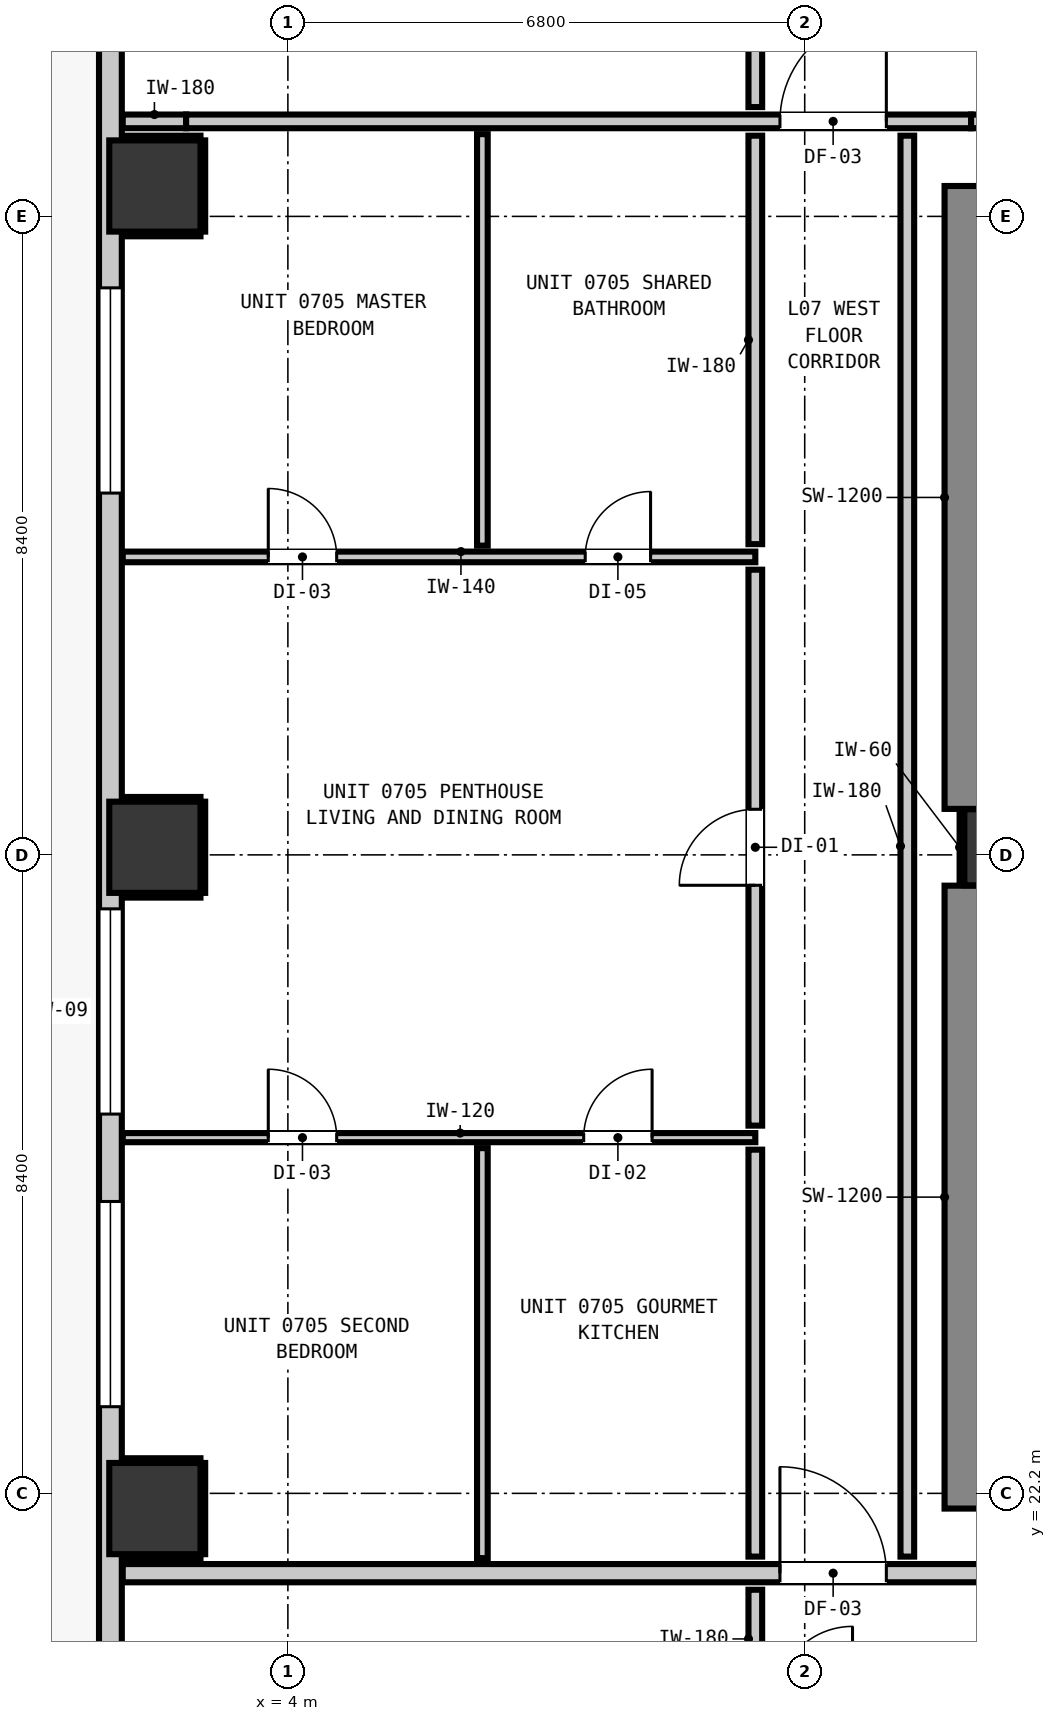
"""IFC4 building model, lengths in metres.
Left out: names, types, materials, properties, quantities, classifications, styles, units other than length and angle.
Written with IfcOpenShell. Run it as: python <this file> out.ifc"""

import sys

from ifc_helpers import new_model, si_unit, direction, frame, frame_2d, origin, origin_2d, place, context, subcontext, project, spatial, rectangle, extrude, element, fill, save


model = new_model("IFC4")
c1 = context("Model", 3, precision=1e-05, world=origin(), true_north=direction((0.0, 1.0)))
c2 = subcontext(c1, "Body", "Model", "MODEL_VIEW")
j1 = project(units=[si_unit("LENGTHUNIT", "METRE"), si_unit("PLANEANGLEUNIT", "RADIAN")], contexts=[c1])
p1 = place(None, origin())
s1 = spatial("IfcSite", under=j1, at=p1, CompositionType="ELEMENT")
p2 = place(p1, origin())
s2 = spatial("IfcBuilding", under=s1, at=p2, CompositionType="ELEMENT")
p3 = place(p2, frame((0.0, 0.0, 28.64)))
s3 = spatial("IfcBuildingStorey", under=s2, at=p3, CompositionType="ELEMENT", Elevation=28.64)
p4 = place(p3, frame((13.4, 30.7, 0.0), z_axis=(0.0, 0.0, 1.0), x_axis=(1.0, 0.0, 0.0)))
e1 = element("IfcColumn", 1, at=p4, inside=s3, PredefinedType="COLUMN", context=c2, shape_type="SweptSolid", body=[
    extrude(rectangle(XDim=1.0, YDim=1.0, at=origin_2d()), origin(), (0.0, 0.0, 1.0), 3.32),
])
p5 = place(p3, frame((13.24, 22.0, 0.0), z_axis=(0.0, 0.0, 1.0), x_axis=(0.0, 1.0, 0.0)))
e2 = element("IfcWall", 2, at=p5, inside=s3, PredefinedType="SHEAR", context=c2, shape_type="SweptSolid", body=[
    extrude(rectangle(XDim=8.195, YDim=1.2, at=frame_2d((4.098, 0.0))), origin(), (0.0, 0.0, 1.0), 3.32),
])
p6 = place(p3, frame((13.24, 31.205, 0.0), z_axis=(0.0, 0.0, 1.0), x_axis=(0.0, 1.0, 0.0)))
e3 = element("IfcWall", 3, at=p6, inside=s3, PredefinedType="SHEAR", context=c2, shape_type="SweptSolid", body=[
    extrude(rectangle(XDim=8.195, YDim=1.2, at=frame_2d((4.097, 0.0))), origin(), (0.0, 0.0, 1.0), 3.32),
])
for number, where, z_axis, x_axis in (
    (4, (2.25, 22.0, 0.0), (0.0, 0.0, 1.0), (1.0, 0.0, 0.0)),
    (5, (2.25, 30.7, 0.0), (0.0, 0.0, 1.0), (1.0, 0.0, 0.0)),
    (6, (2.25, 39.4, 0.0), (0.0, 0.0, 1.0), (1.0, 0.0, 0.0)),
):
    element("IfcColumn", number, at=place(p3, frame(where, z_axis=z_axis, x_axis=x_axis)), inside=s3, PredefinedType="COLUMN", context=c2, shape_type="SweptSolid", body=[
        extrude(rectangle(XDim=1.2, YDim=1.2, at=origin_2d()), origin(), (0.0, 0.0, 1.0), 3.32),
    ])
p7 = place(p3, frame((1.665, 10.165, 0.0), z_axis=(0.0, 0.0, 1.0), x_axis=(0.0, 1.0, 0.0)))
e7 = element("IfcWall", 7, at=p7, inside=s3, PredefinedType="STANDARD", context=c2, shape_type="SweptSolid", body=[
    extrude(rectangle(XDim=34.67, YDim=0.3, at=frame_2d((17.335, 0.0))), origin(), (0.0, 0.0, 1.0), 3.06),
])
p8 = place(p7, frame((0.901, 0.0, 0.0)))
e8 = element("IfcOpeningElement", 8, at=p8, cuts=e7, PredefinedType="OPENING", context=c2, shape_type="SweptSolid", body=[
    extrude(rectangle(XDim=1.0, YDim=2.15, at=frame_2d((0.5, 1.075))), frame((0.0, 0.16, 0.0), z_axis=(0.0, -1.0, 0.0), x_axis=(1.0, 0.0, 0.0)), (0.0, 0.0, 1.0), 0.32),
])
p9 = place(p7, frame((17.025, 0.0, 0.85)))
e9 = element("IfcOpeningElement", 9, at=p9, cuts=e7, PredefinedType="OPENING", context=c2, shape_type="SweptSolid", body=[
    extrude(rectangle(XDim=2.7, YDim=2.0, at=frame_2d((1.35, 1.0))), frame((0.0, 0.16, 0.0), z_axis=(0.0, -1.0, 0.0), x_axis=(1.0, 0.0, 0.0)), (0.0, 0.0, 1.0), 0.32),
])
p10 = place(p7, frame((13.175, 0.0, 0.85)))
e10 = element("IfcOpeningElement", 10, at=p10, cuts=e7, PredefinedType="OPENING", context=c2, shape_type="SweptSolid", body=[
    extrude(rectangle(XDim=2.7, YDim=2.0, at=frame_2d((1.35, 1.0))), frame((0.0, 0.16, 0.0), z_axis=(0.0, -1.0, 0.0), x_axis=(1.0, 0.0, 0.0)), (0.0, 0.0, 1.0), 0.32),
])
p11 = place(p7, frame((25.195, 0.0, 0.85)))
e11 = element("IfcOpeningElement", 11, at=p11, cuts=e7, PredefinedType="OPENING", context=c2, shape_type="SweptSolid", body=[
    extrude(rectangle(XDim=2.7, YDim=2.0, at=frame_2d((1.35, 1.0))), frame((0.0, 0.16, 0.0), z_axis=(0.0, -1.0, 0.0), x_axis=(1.0, 0.0, 0.0)), (0.0, 0.0, 1.0), 0.32),
])
p12 = place(p3, frame((1.827, 21.15, 0.0), z_axis=(0.0, 0.0, 1.0), x_axis=(1.0, 0.0, 0.0)))
e12 = element("IfcWall", 12, at=p12, inside=s3, PredefinedType="PARTITIONING", context=c2, shape_type="SweptSolid", body=[
    extrude(rectangle(XDim=42.146, YDim=0.24, at=frame_2d((21.073, 0.0))), origin(), (0.0, 0.0, 1.0), 3.06),
])
p13 = place(p12, frame((16.383, 0.0, 0.0)))
e13 = element("IfcOpeningElement", 13, at=p13, cuts=e12, PredefinedType="OPENING", context=c2, shape_type="SweptSolid", body=[
    extrude(rectangle(XDim=1.1, YDim=2.15, at=frame_2d((0.55, 1.075))), frame((0.0, 0.13, 0.0), z_axis=(0.0, -1.0, 0.0), x_axis=(1.0, 0.0, 0.0)), (0.0, 0.0, 1.0), 0.26),
])
p14 = place(p12, frame((8.647, 0.0, 0.0)))
e14 = element("IfcOpeningElement", 14, at=p14, cuts=e12, PredefinedType="OPENING", context=c2, shape_type="SweptSolid", body=[
    extrude(rectangle(XDim=1.4, YDim=2.15, at=frame_2d((0.7, 1.075))), frame((0.0, 0.13, 0.0), z_axis=(0.0, -1.0, 0.0), x_axis=(1.0, 0.0, 0.0)), (0.0, 0.0, 1.0), 0.26),
])
p15 = place(p12, frame((38.574, 0.0, 0.0)))
e15 = element("IfcOpeningElement", 15, at=p15, cuts=e12, PredefinedType="OPENING", context=c2, shape_type="SweptSolid", body=[
    extrude(rectangle(XDim=0.9, YDim=2.1, at=frame_2d((0.45, 1.05))), frame((0.0, 0.13, 0.0), z_axis=(0.0, -1.0, 0.0), x_axis=(1.0, 0.0, 0.0)), (0.0, 0.0, 1.0), 0.26),
])
p16 = place(p3, frame((1.827, 40.25, 0.0), z_axis=(0.0, 0.0, 1.0), x_axis=(1.0, 0.0, 0.0)))
e16 = element("IfcWall", 16, at=p16, inside=s3, PredefinedType="PARTITIONING", context=c2, shape_type="SweptSolid", body=[
    extrude(rectangle(XDim=0.834, YDim=0.18, at=frame_2d((0.417, 0.0))), origin(), (0.0, 0.0, 1.0), 3.06),
])
p17 = place(p3, frame((2.661, 40.25, 0.0), z_axis=(0.0, 0.0, 1.0), x_axis=(1.0, 0.0, 0.0)))
e17 = element("IfcWall", 17, at=p17, inside=s3, PredefinedType="PARTITIONING", context=c2, shape_type="SweptSolid", body=[
    extrude(rectangle(XDim=10.328, YDim=0.18, at=frame_2d((5.164, 0.0))), origin(), (0.0, 0.0, 1.0), 2.445),
])
p18 = place(p17, frame((7.813, 0.0, 0.0)))
e18 = element("IfcOpeningElement", 18, at=p18, cuts=e17, PredefinedType="OPENING", context=c2, shape_type="SweptSolid", body=[
    extrude(rectangle(XDim=1.4, YDim=2.15, at=frame_2d((0.7, 1.075))), frame((0.0, 0.1, 0.0), z_axis=(0.0, -1.0, 0.0), x_axis=(1.0, 0.0, 0.0)), (0.0, 0.0, 1.0), 0.2),
])
p19 = place(p3, frame((12.989, 40.25, 0.0), z_axis=(0.0, 0.0, 1.0), x_axis=(1.0, 0.0, 0.0)))
e19 = element("IfcWall", 19, at=p19, inside=s3, PredefinedType="PARTITIONING", context=c2, shape_type="SweptSolid", body=[
    extrude(rectangle(XDim=30.984, YDim=0.18, at=frame_2d((15.492, 0.0))), origin(), (0.0, 0.0, 1.0), 3.06),
])
p20 = place(p19, frame((4.446, 0.0, 0.0)))
e20 = element("IfcOpeningElement", 20, at=p20, cuts=e19, PredefinedType="OPENING", context=c2, shape_type="SweptSolid", body=[
    extrude(rectangle(XDim=1.4, YDim=2.15, at=frame_2d((0.7, 1.075))), frame((0.0, 0.1, 0.0), z_axis=(0.0, -1.0, 0.0), x_axis=(1.0, 0.0, 0.0)), (0.0, 0.0, 1.0), 0.2),
])
p21 = place(p19, frame((27.362, 0.0, 0.0)))
e21 = element("IfcOpeningElement", 21, at=p21, cuts=e19, PredefinedType="OPENING", context=c2, shape_type="SweptSolid", body=[
    extrude(rectangle(XDim=1.0, YDim=2.15, at=frame_2d((0.5, 1.075))), frame((0.0, 0.1, 0.0), z_axis=(0.0, -1.0, 0.0), x_axis=(1.0, 0.0, 0.0)), (0.0, 0.0, 1.0), 0.2),
])
p22 = place(p3, frame((1.827, 34.52, 0.0), z_axis=(0.0, 0.0, 1.0), x_axis=(1.0, 0.0, 0.0)))
e22 = element("IfcWall", 22, at=p22, inside=s3, PredefinedType="PARTITIONING", context=c2, shape_type="SweptSolid", body=[
    extrude(rectangle(XDim=8.323, YDim=0.14, at=frame_2d((4.162, 0.0))), origin(), (0.0, 0.0, 1.0), 3.06),
])
p23 = place(p22, frame((6.085, 0.0, 0.0)))
e23 = element("IfcOpeningElement", 23, at=p23, cuts=e22, PredefinedType="OPENING", context=c2, shape_type="SweptSolid", body=[
    extrude(rectangle(XDim=0.86, YDim=2.02, at=frame_2d((0.43, 1.01))), frame((0.0, 0.08, 0.0), z_axis=(0.0, -1.0, 0.0), x_axis=(1.0, 0.0, 0.0)), (0.0, 0.0, 1.0), 0.16),
])
p24 = place(p22, frame((1.915, 0.0, 0.0)))
e24 = element("IfcOpeningElement", 24, at=p24, cuts=e22, PredefinedType="OPENING", context=c2, shape_type="SweptSolid", body=[
    extrude(rectangle(XDim=0.9, YDim=2.1, at=frame_2d((0.45, 1.05))), frame((0.0, 0.08, 0.0), z_axis=(0.0, -1.0, 0.0), x_axis=(1.0, 0.0, 0.0)), (0.0, 0.0, 1.0), 0.16),
])
p25 = place(p3, frame((1.827, 26.88, 0.0), z_axis=(0.0, 0.0, 1.0), x_axis=(1.0, 0.0, 0.0)))
e25 = element("IfcWall", 25, at=p25, inside=s3, PredefinedType="PARTITIONING", context=c2, shape_type="SweptSolid", body=[
    extrude(rectangle(XDim=8.323, YDim=0.12, at=frame_2d((4.162, 0.0))), origin(), (0.0, 0.0, 1.0), 3.06),
])
p26 = place(p25, frame((6.065, 0.0, 0.0)))
e26 = element("IfcOpeningElement", 26, at=p26, cuts=e25, PredefinedType="OPENING", context=c2, shape_type="SweptSolid", body=[
    extrude(rectangle(XDim=0.9, YDim=2.1, at=frame_2d((0.45, 1.05))), frame((0.0, 0.07, 0.0), z_axis=(0.0, -1.0, 0.0), x_axis=(1.0, 0.0, 0.0)), (0.0, 0.0, 1.0), 0.14),
])
p27 = place(p25, frame((1.915, 0.0, 0.0)))
e27 = element("IfcOpeningElement", 27, at=p27, cuts=e25, PredefinedType="OPENING", context=c2, shape_type="SweptSolid", body=[
    extrude(rectangle(XDim=0.9, YDim=2.1, at=frame_2d((0.45, 1.05))), frame((0.0, 0.07, 0.0), z_axis=(0.0, -1.0, 0.0), x_axis=(1.0, 0.0, 0.0)), (0.0, 0.0, 1.0), 0.14),
])
p28 = place(p3, frame((10.15, 19.638, 0.0), z_axis=(0.0, 0.0, 1.0), x_axis=(0.0, 1.0, 0.0)))
e28 = element("IfcWall", 28, at=p28, inside=s3, PredefinedType="PARTITIONING", context=c2, shape_type="SweptSolid", body=[
    extrude(rectangle(XDim=1.294, YDim=0.18, at=frame_2d((0.647, 0.0))), origin(), (0.0, 0.0, 1.0), 3.06),
])
p29 = place(p3, frame((10.15, 21.368, 0.0), z_axis=(0.0, 0.0, 1.0), x_axis=(0.0, 1.0, 0.0)))
e29 = element("IfcWall", 29, at=p29, inside=s3, PredefinedType="PARTITIONING", context=c2, shape_type="SweptSolid", body=[
    extrude(rectangle(XDim=5.354, YDim=0.18, at=frame_2d((2.677, 0.0))), origin(), (0.0, 0.0, 1.0), 3.06),
])
p30 = place(p3, frame((10.15, 27.038, 0.0), z_axis=(0.0, 0.0, 1.0), x_axis=(0.0, 1.0, 0.0)))
e30 = element("IfcWall", 30, at=p30, inside=s3, PredefinedType="PARTITIONING", context=c2, shape_type="SweptSolid", body=[
    extrude(rectangle(XDim=7.314, YDim=0.18, at=frame_2d((3.657, 0.0))), origin(), (0.0, 0.0, 1.0), 3.06),
])
p31 = place(p30, frame((3.162, 0.0, 0.0)))
e31 = element("IfcOpeningElement", 31, at=p31, cuts=e30, PredefinedType="OPENING", context=c2, shape_type="SweptSolid", body=[
    extrude(rectangle(XDim=1.0, YDim=2.15, at=frame_2d((0.5, 1.075))), frame((0.0, 0.1, 0.0), z_axis=(0.0, -1.0, 0.0), x_axis=(1.0, 0.0, 0.0)), (0.0, 0.0, 1.0), 0.2),
])
p32 = place(p3, frame((10.15, 34.688, 0.0), z_axis=(0.0, 0.0, 1.0), x_axis=(0.0, 1.0, 0.0)))
e32 = element("IfcWall", 32, at=p32, inside=s3, PredefinedType="PARTITIONING", context=c2, shape_type="SweptSolid", body=[
    extrude(rectangle(XDim=5.374, YDim=0.18, at=frame_2d((2.687, 0.0))), origin(), (0.0, 0.0, 1.0), 3.06),
])
p33 = place(p3, frame((10.15, 40.438, 0.0), z_axis=(0.0, 0.0, 1.0), x_axis=(0.0, 1.0, 0.0)))
e33 = element("IfcWall", 33, at=p33, inside=s3, PredefinedType="PARTITIONING", context=c2, shape_type="SweptSolid", body=[
    extrude(rectangle(XDim=1.324, YDim=0.18, at=frame_2d((0.662, 0.0))), origin(), (0.0, 0.0, 1.0), 3.06),
])
p34 = place(p3, frame((12.15, 21.368, 0.0), z_axis=(0.0, 0.0, 1.0), x_axis=(0.0, 1.0, 0.0)))
e34 = element("IfcWall", 34, at=p34, inside=s3, PredefinedType="PARTITIONING", context=c2, shape_type="SweptSolid", body=[
    extrude(rectangle(XDim=18.694, YDim=0.18, at=frame_2d((9.347, 0.0))), origin(), (0.0, 0.0, 1.0), 3.06),
])
p35 = place(p3, frame((6.559, 21.348, 0.0), z_axis=(0.0, 0.0, 1.0), x_axis=(0.0, 1.0, 0.0)))
e35 = element("IfcWall", 35, at=p35, inside=s3, PredefinedType="PARTITIONING", context=c2, shape_type="SweptSolid", body=[
    extrude(rectangle(XDim=5.394, YDim=0.14, at=frame_2d((2.697, 0.0))), origin(), (0.0, 0.0, 1.0), 3.06),
])
p36 = place(p3, frame((6.559, 34.668, 0.0), z_axis=(0.0, 0.0, 1.0), x_axis=(0.0, 1.0, 0.0)))
e36 = element("IfcWall", 36, at=p36, inside=s3, PredefinedType="PARTITIONING", context=c2, shape_type="SweptSolid", body=[
    extrude(rectangle(XDim=5.414, YDim=0.14, at=frame_2d((2.707, 0.0))), origin(), (0.0, 0.0, 1.0), 3.06),
])
p37 = place(p3, frame((12.868, 30.21, 0.0), z_axis=(0.0, 0.0, 1.0), x_axis=(0.0, 1.0, 0.0)))
e37 = element("IfcWall", 37, at=p37, inside=s3, PredefinedType="PARTITIONING", context=c2, shape_type="SweptSolid", body=[
    extrude(rectangle(XDim=0.98, YDim=0.06, at=frame_2d((0.49, 0.0))), origin(), (0.0, 0.0, 1.0), 1.45),
])
for number, where, z_axis, x_axis in (
    (38, (1.83, 21.368, 0.0), (0.0, 0.0, 1.0), (1.0, 0.0, 0.0)),
    (39, (1.83, 22.632, 0.0), (0.0, 0.0, 1.0), (1.0, 0.0, 0.0)),
):
    element("IfcWall", number, at=place(p3, frame(where, z_axis=z_axis, x_axis=x_axis)), inside=s3, PredefinedType="PARTITIONING", context=c2, shape_type="SweptSolid", body=[
        extrude(rectangle(XDim=1.02, YDim=0.06, at=frame_2d((0.51, 0.0))), origin(), (0.0, 0.0, 1.0), 1.45),
    ])
p38 = place(p3, frame((2.882, 21.4, 0.0), z_axis=(0.0, 0.0, 1.0), x_axis=(0.0, 1.0, 0.0)))
e40 = element("IfcWall", 40, at=p38, inside=s3, PredefinedType="PARTITIONING", context=c2, shape_type="SweptSolid", body=[
    extrude(rectangle(XDim=1.2, YDim=0.06, at=frame_2d((0.6, 0.0))), origin(), (0.0, 0.0, 1.0), 1.45),
])
for number, where, z_axis, x_axis in (
    (41, (1.83, 30.068, 0.0), (0.0, 0.0, 1.0), (1.0, 0.0, 0.0)),
    (42, (1.83, 31.332, 0.0), (0.0, 0.0, 1.0), (1.0, 0.0, 0.0)),
):
    element("IfcWall", number, at=place(p3, frame(where, z_axis=z_axis, x_axis=x_axis)), inside=s3, PredefinedType="PARTITIONING", context=c2, shape_type="SweptSolid", body=[
        extrude(rectangle(XDim=1.02, YDim=0.06, at=frame_2d((0.51, 0.0))), origin(), (0.0, 0.0, 1.0), 1.45),
    ])
p39 = place(p3, frame((2.882, 30.1, 0.0), z_axis=(0.0, 0.0, 1.0), x_axis=(0.0, 1.0, 0.0)))
e43 = element("IfcWall", 43, at=p39, inside=s3, PredefinedType="PARTITIONING", context=c2, shape_type="SweptSolid", body=[
    extrude(rectangle(XDim=1.2, YDim=0.06, at=frame_2d((0.6, 0.0))), origin(), (0.0, 0.0, 1.0), 1.45),
])
for number, where, z_axis, x_axis in (
    (44, (1.83, 38.768, 0.0), (0.0, 0.0, 1.0), (1.0, 0.0, 0.0)),
    (45, (1.83, 40.032, 0.0), (0.0, 0.0, 1.0), (1.0, 0.0, 0.0)),
):
    element("IfcWall", number, at=place(p3, frame(where, z_axis=z_axis, x_axis=x_axis)), inside=s3, PredefinedType="PARTITIONING", context=c2, shape_type="SweptSolid", body=[
        extrude(rectangle(XDim=1.02, YDim=0.06, at=frame_2d((0.51, 0.0))), origin(), (0.0, 0.0, 1.0), 1.45),
    ])
p40 = place(p3, frame((2.882, 38.8, 0.0), z_axis=(0.0, 0.0, 1.0), x_axis=(0.0, 1.0, 0.0)))
e46 = element("IfcWall", 46, at=p40, inside=s3, PredefinedType="PARTITIONING", context=c2, shape_type="SweptSolid", body=[
    extrude(rectangle(XDim=1.2, YDim=0.06, at=frame_2d((0.6, 0.0))), origin(), (0.0, 0.0, 1.0), 1.45),
])
p41 = place(p9, origin())
e47 = element("IfcWindow", 47, at=p41, inside=s3, PartitioningType="SINGLE_PANEL", PredefinedType="WINDOW", context=c2, shape_type="SweptSolid", body=[
    extrude(rectangle(XDim=2.7, YDim=2.0, at=frame_2d((1.35, 1.0))), frame((0.0, 0.03, 0.0), z_axis=(0.0, -1.0, 0.0), x_axis=(1.0, 0.0, 0.0)), (0.0, 0.0, 1.0), 0.06),
])
fill(e9, e47)
p42 = place(p10, origin())
e48 = element("IfcWindow", 48, at=p42, inside=s3, PartitioningType="SINGLE_PANEL", PredefinedType="WINDOW", context=c2, shape_type="SweptSolid", body=[
    extrude(rectangle(XDim=2.7, YDim=2.0, at=frame_2d((1.35, 1.0))), frame((0.0, 0.03, 0.0), z_axis=(0.0, -1.0, 0.0), x_axis=(1.0, 0.0, 0.0)), (0.0, 0.0, 1.0), 0.06),
])
fill(e10, e48)
p43 = place(p11, origin())
e49 = element("IfcWindow", 49, at=p43, inside=s3, PartitioningType="SINGLE_PANEL", PredefinedType="WINDOW", context=c2, shape_type="SweptSolid", body=[
    extrude(rectangle(XDim=2.7, YDim=2.0, at=frame_2d((1.35, 1.0))), frame((0.0, 0.03, 0.0), z_axis=(0.0, -1.0, 0.0), x_axis=(1.0, 0.0, 0.0)), (0.0, 0.0, 1.0), 0.06),
])
fill(e11, e49)
p44 = place(p14, origin())
e50 = element("IfcDoor", 50, at=p44, inside=s3, OperationType="SINGLE_SWING_LEFT", PredefinedType="DOOR", context=c2, shape_type="SweptSolid", body=[
    extrude(rectangle(XDim=1.4, YDim=2.15, at=frame_2d((0.7, 1.075))), frame((0.0, 0.025, 0.0), z_axis=(0.0, -1.0, 0.0), x_axis=(1.0, 0.0, 0.0)), (0.0, 0.0, 1.0), 0.05),
])
fill(e14, e50)
p45 = place(p18, origin())
e51 = element("IfcDoor", 51, at=p45, inside=s3, OperationType="SINGLE_SWING_RIGHT", PredefinedType="DOOR", context=c2, shape_type="SweptSolid", body=[
    extrude(rectangle(XDim=1.4, YDim=2.15, at=frame_2d((0.7, 1.075))), frame((0.0, 0.025, 0.0), z_axis=(0.0, -1.0, 0.0), x_axis=(1.0, 0.0, 0.0)), (0.0, 0.0, 1.0), 0.05),
])
fill(e18, e51)
p46 = place(p31, origin())
e52 = element("IfcDoor", 52, at=p46, inside=s3, OperationType="SINGLE_SWING_LEFT", PredefinedType="DOOR", context=c2, shape_type="SweptSolid", body=[
    extrude(rectangle(XDim=1.0, YDim=2.15, at=frame_2d((0.5, 1.075))), frame((0.0, 0.025, 0.0), z_axis=(0.0, -1.0, 0.0), x_axis=(1.0, 0.0, 0.0)), (0.0, 0.0, 1.0), 0.05),
])
fill(e31, e52)
p47 = place(p26, origin())
e53 = element("IfcDoor", 53, at=p47, inside=s3, OperationType="SINGLE_SWING_RIGHT", PredefinedType="DOOR", context=c2, shape_type="SweptSolid", body=[
    extrude(rectangle(XDim=0.9, YDim=2.1, at=frame_2d((0.45, 1.05))), frame((0.0, 0.025, 0.0), z_axis=(0.0, -1.0, 0.0), x_axis=(1.0, 0.0, 0.0)), (0.0, 0.0, 1.0), 0.05),
])
fill(e26, e53)
p48 = place(p27, origin())
e54 = element("IfcDoor", 54, at=p48, inside=s3, OperationType="SINGLE_SWING_LEFT", PredefinedType="DOOR", context=c2, shape_type="SweptSolid", body=[
    extrude(rectangle(XDim=0.9, YDim=2.1, at=frame_2d((0.45, 1.05))), frame((0.0, 0.025, 0.0), z_axis=(0.0, -1.0, 0.0), x_axis=(1.0, 0.0, 0.0)), (0.0, 0.0, 1.0), 0.05),
])
fill(e27, e54)
p49 = place(p23, origin())
e55 = element("IfcDoor", 55, at=p49, inside=s3, OperationType="SINGLE_SWING_RIGHT", PredefinedType="DOOR", context=c2, shape_type="SweptSolid", body=[
    extrude(rectangle(XDim=0.86, YDim=2.02, at=frame_2d((0.43, 1.01))), frame((0.0, 0.025, 0.0), z_axis=(0.0, -1.0, 0.0), x_axis=(1.0, 0.0, 0.0)), (0.0, 0.0, 1.0), 0.05),
])
fill(e23, e55)
p50 = place(p24, origin())
e56 = element("IfcDoor", 56, at=p50, inside=s3, OperationType="SINGLE_SWING_LEFT", PredefinedType="DOOR", context=c2, shape_type="SweptSolid", body=[
    extrude(rectangle(XDim=0.9, YDim=2.1, at=frame_2d((0.45, 1.05))), frame((0.0, 0.025, 0.0), z_axis=(0.0, -1.0, 0.0), x_axis=(1.0, 0.0, 0.0)), (0.0, 0.0, 1.0), 0.05),
])
fill(e24, e56)
save(model, sys.argv[1])
